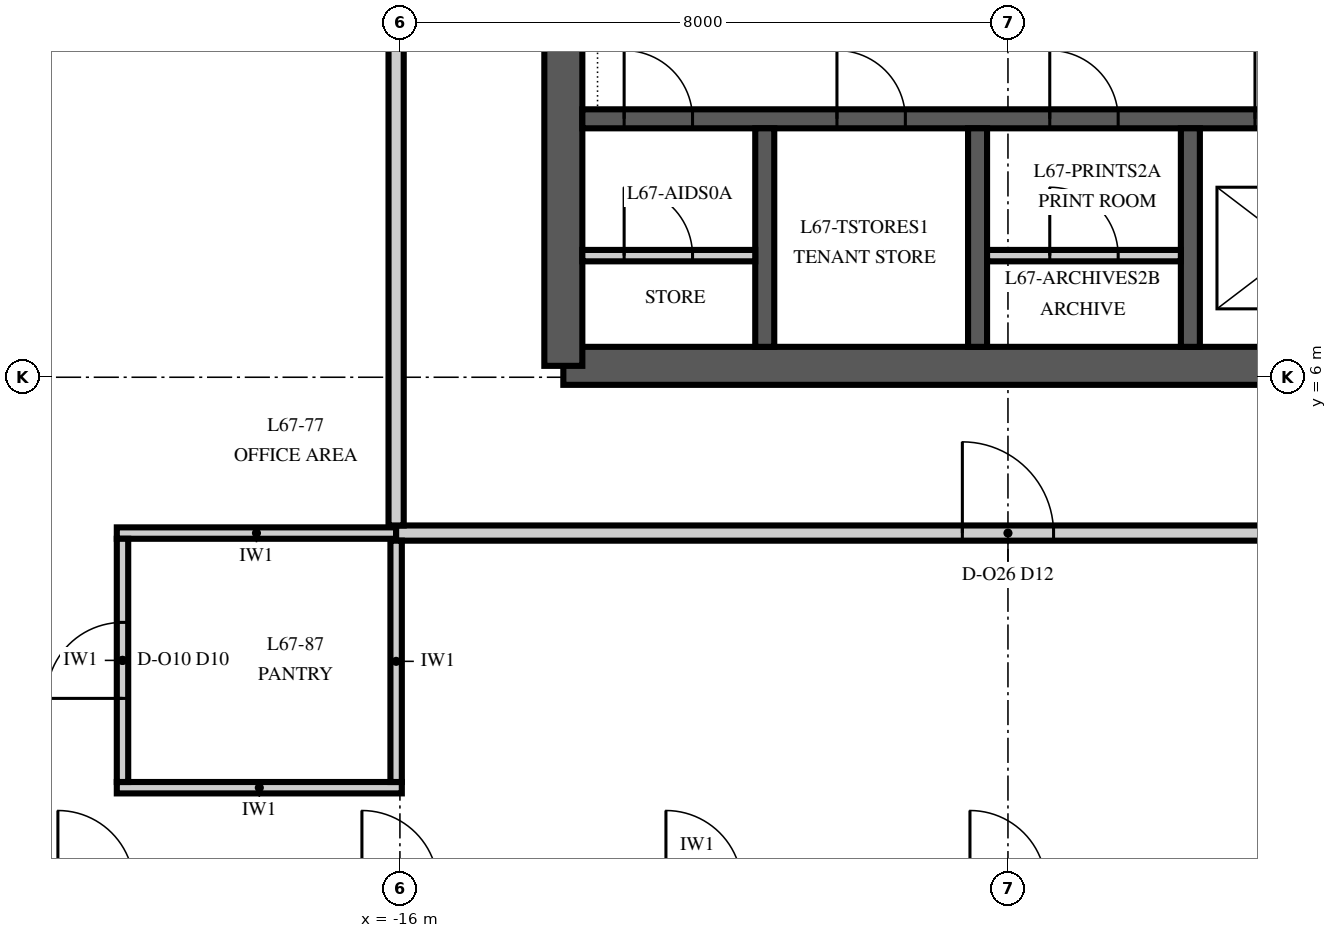
"""IFC4 building model, lengths in metres.
Left out: names, types, materials, properties, quantities, classifications, styles, units other than length and angle.
Written with IfcOpenShell. Run it as: python <this file> out.ifc"""

import sys

from ifc_helpers import new_model, si_unit, direction, frame, frame_2d, origin, place, context, subcontext, project, spatial, polyline, rectangle, outline, extrude, element, fill, save


model = new_model("IFC4")
c1 = context("Model", 3, precision=1e-05, world=origin(), true_north=direction((0.0, 1.0)))
c2 = subcontext(c1, "Body", "Model", "MODEL_VIEW")
j1 = project(units=[si_unit("LENGTHUNIT", "METRE"), si_unit("PLANEANGLEUNIT", "RADIAN")], contexts=[c1])
p1 = place(None, origin())
s1 = spatial("IfcSite", under=j1, at=p1, CompositionType="ELEMENT")
p2 = place(p1, origin())
s2 = spatial("IfcBuilding", under=s1, at=p2, CompositionType="ELEMENT")
p3 = place(p2, frame((0.0, 0.0, 288.0)))
s3 = spatial("IfcBuildingStorey", under=s2, at=p3, CompositionType="ELEMENT", Elevation=288.0)
p4 = place(p3, frame((-13.85, 6.15, 0.0), z_axis=(0.0, 0.0, 1.0), x_axis=(1.0, 0.0, 0.0)))
e1 = element("IfcWall", 1, at=p4, inside=s3, PredefinedType="SHEAR", context=c2, shape_type="SweptSolid", body=[
    extrude(rectangle(XDim=27.7, YDim=0.5, at=frame_2d((13.85, 0.0))), origin(), (0.0, 0.0, 1.0), 4.0),
])
p5 = place(p3, frame((-13.85, 23.85, 0.0), z_axis=(0.0, 0.0, 1.0), x_axis=(0.0, -1.0, 0.0)))
e2 = element("IfcWall", 2, at=p5, inside=s3, PredefinedType="SHEAR", context=c2, shape_type="SweptSolid", body=[
    extrude(outline(polyline([(0.0, -0.25), (17.7, -0.25), (17.7, 0.0), (17.45, 0.0), (17.45, 0.25), (0.25, 0.25), (0.25, 0.0), (0.0, 0.0), (0.0, -0.25)])), origin(), (0.0, 0.0, 1.0), 4.0),
])
p6 = place(p5, frame((11.75, 0.0, 0.0)))
e3 = element("IfcOpeningElement", 3, at=p6, cuts=e2, PredefinedType="OPENING", context=c2, shape_type="SweptSolid", body=[
    extrude(rectangle(XDim=1.8, YDim=2.4, at=frame_2d((0.9, 1.2))), frame((0.0, 0.265, 0.0), z_axis=(0.0, -1.0, 0.0), x_axis=(1.0, 0.0, 0.0)), (0.0, 0.0, 1.0), 0.53),
])
p7 = place(p3, frame((-13.6, 9.4, 0.0), z_axis=(0.0, 0.0, 1.0), x_axis=(1.0, 0.0, 0.0)))
e4 = element("IfcWall", 4, at=p7, inside=s3, PredefinedType="SHEAR", context=c2, shape_type="SweptSolid", body=[
    extrude(rectangle(XDim=27.2, YDim=0.25, at=frame_2d((13.6, 0.0))), origin(), (0.0, 0.0, 1.0), 4.0),
])
p8 = place(p7, frame((8.85, 0.0, 0.0)))
e5 = element("IfcOpeningElement", 5, at=p8, cuts=e4, PredefinedType="OPENING", context=c2, shape_type="SweptSolid", body=[
    extrude(rectangle(XDim=1.1, YDim=2.1, at=frame_2d((0.55, 1.05))), frame((0.0, 0.14, 0.0), z_axis=(0.0, -1.0, 0.0), x_axis=(1.0, 0.0, 0.0)), (0.0, 0.0, 1.0), 0.28),
])
p9 = place(p7, frame((11.65, 0.0, 0.0)))
e6 = element("IfcOpeningElement", 6, at=p9, cuts=e4, PredefinedType="OPENING", context=c2, shape_type="SweptSolid", body=[
    extrude(rectangle(XDim=1.1, YDim=2.1, at=frame_2d((0.55, 1.05))), frame((0.0, 0.14, 0.0), z_axis=(0.0, -1.0, 0.0), x_axis=(1.0, 0.0, 0.0)), (0.0, 0.0, 1.0), 0.28),
])
p10 = place(p7, frame((14.45, 0.0, 0.0)))
e7 = element("IfcOpeningElement", 7, at=p10, cuts=e4, PredefinedType="OPENING", context=c2, shape_type="SweptSolid", body=[
    extrude(rectangle(XDim=1.1, YDim=2.1, at=frame_2d((0.55, 1.05))), frame((0.0, 0.14, 0.0), z_axis=(0.0, -1.0, 0.0), x_axis=(1.0, 0.0, 0.0)), (0.0, 0.0, 1.0), 0.28),
])
p11 = place(p7, frame((0.55, 0.0, 0.0)))
e8 = element("IfcOpeningElement", 8, at=p11, cuts=e4, PredefinedType="OPENING", context=c2, shape_type="SweptSolid", body=[
    extrude(rectangle(XDim=0.9, YDim=2.1, at=frame_2d((0.45, 1.05))), frame((0.0, 0.14, 0.0), z_axis=(0.0, -1.0, 0.0), x_axis=(1.0, 0.0, 0.0)), (0.0, 0.0, 1.0), 0.28),
])
p12 = place(p7, frame((3.35, 0.0, 0.0)))
e9 = element("IfcOpeningElement", 9, at=p12, cuts=e4, PredefinedType="OPENING", context=c2, shape_type="SweptSolid", body=[
    extrude(rectangle(XDim=0.9, YDim=2.1, at=frame_2d((0.45, 1.05))), frame((0.0, 0.14, 0.0), z_axis=(0.0, -1.0, 0.0), x_axis=(1.0, 0.0, 0.0)), (0.0, 0.0, 1.0), 0.28),
])
p13 = place(p7, frame((6.15, 0.0, 0.0)))
e10 = element("IfcOpeningElement", 10, at=p13, cuts=e4, PredefinedType="OPENING", context=c2, shape_type="SweptSolid", body=[
    extrude(rectangle(XDim=0.9, YDim=2.1, at=frame_2d((0.45, 1.05))), frame((0.0, 0.14, 0.0), z_axis=(0.0, -1.0, 0.0), x_axis=(1.0, 0.0, 0.0)), (0.0, 0.0, 1.0), 0.28),
])
p14 = place(p7, frame((17.35, 0.0, 0.0)))
e11 = element("IfcOpeningElement", 11, at=p14, cuts=e4, PredefinedType="OPENING", context=c2, shape_type="SweptSolid", body=[
    extrude(rectangle(XDim=0.9, YDim=2.1, at=frame_2d((0.45, 1.05))), frame((0.0, 0.14, 0.0), z_axis=(0.0, -1.0, 0.0), x_axis=(1.0, 0.0, 0.0)), (0.0, 0.0, 1.0), 0.28),
])
p15 = place(p7, frame((20.15, 0.0, 0.0)))
e12 = element("IfcOpeningElement", 12, at=p15, cuts=e4, PredefinedType="OPENING", context=c2, shape_type="SweptSolid", body=[
    extrude(rectangle(XDim=0.9, YDim=2.1, at=frame_2d((0.45, 1.05))), frame((0.0, 0.14, 0.0), z_axis=(0.0, -1.0, 0.0), x_axis=(1.0, 0.0, 0.0)), (0.0, 0.0, 1.0), 0.28),
])
p16 = place(p7, frame((22.95, 0.0, 0.0)))
e13 = element("IfcOpeningElement", 13, at=p16, cuts=e4, PredefinedType="OPENING", context=c2, shape_type="SweptSolid", body=[
    extrude(rectangle(XDim=0.9, YDim=2.1, at=frame_2d((0.45, 1.05))), frame((0.0, 0.14, 0.0), z_axis=(0.0, -1.0, 0.0), x_axis=(1.0, 0.0, 0.0)), (0.0, 0.0, 1.0), 0.28),
])
for number, where, z_axis, x_axis in (
    (14, (-11.2, 6.4, 0.0), (0.0, 0.0, 1.0), (0.0, 1.0, 0.0)),
    (15, (-8.4, 6.4, 0.0), (0.0, 0.0, 1.0), (0.0, 1.0, 0.0)),
    (16, (-5.6, 6.4, 0.0), (0.0, 0.0, 1.0), (0.0, 1.0, 0.0)),
):
    element("IfcWall", number, at=place(p3, frame(where, z_axis=z_axis, x_axis=x_axis)), inside=s3, PredefinedType="SHEAR", context=c2, shape_type="SweptSolid", body=[
        extrude(rectangle(XDim=2.875, YDim=0.25, at=frame_2d((1.438, 0.0))), origin(), (0.0, 0.0, 1.0), 4.0),
    ])
p17 = place(p3, frame((-13.6, 7.6, 0.0), z_axis=(0.0, 0.0, 1.0), x_axis=(1.0, 0.0, 0.0)))
e17 = element("IfcWall", 17, at=p17, inside=s3, PredefinedType="PARTITIONING", context=c2, shape_type="SweptSolid", body=[
    extrude(rectangle(XDim=2.275, YDim=0.15, at=frame_2d((1.138, 0.0))), origin(), (0.0, 0.0, 1.0), 3.85),
])
p18 = place(p17, frame((0.55, 0.0, 0.0)))
e18 = element("IfcOpeningElement", 18, at=p18, cuts=e17, PredefinedType="OPENING", context=c2, shape_type="SweptSolid", body=[
    extrude(rectangle(XDim=0.9, YDim=2.1, at=frame_2d((0.45, 1.05))), frame((0.0, 0.09, 0.0), z_axis=(0.0, -1.0, 0.0), x_axis=(1.0, 0.0, 0.0)), (0.0, 0.0, 1.0), 0.18),
])
p19 = place(p3, frame((-8.275, 7.6, 0.0), z_axis=(0.0, 0.0, 1.0), x_axis=(1.0, 0.0, 0.0)))
e19 = element("IfcWall", 19, at=p19, inside=s3, PredefinedType="PARTITIONING", context=c2, shape_type="SweptSolid", body=[
    extrude(rectangle(XDim=2.55, YDim=0.15, at=frame_2d((1.275, 0.0))), origin(), (0.0, 0.0, 1.0), 3.85),
])
p20 = place(p19, frame((0.825, 0.0, 0.0)))
e20 = element("IfcOpeningElement", 20, at=p20, cuts=e19, PredefinedType="OPENING", context=c2, shape_type="SweptSolid", body=[
    extrude(rectangle(XDim=0.9, YDim=2.1, at=frame_2d((0.45, 1.05))), frame((0.0, 0.09, 0.0), z_axis=(0.0, -1.0, 0.0), x_axis=(1.0, 0.0, 0.0)), (0.0, 0.0, 1.0), 0.18),
])
p21 = place(p3, frame((-19.725, 0.6, 0.0), z_axis=(0.0, 0.0, 1.0), x_axis=(1.0, 0.0, 0.0)))
e21 = element("IfcWall", 21, at=p21, inside=s3, PredefinedType="PARTITIONING", context=c2, shape_type="SweptSolid", body=[
    extrude(rectangle(XDim=3.75, YDim=0.15, at=frame_2d((1.875, 0.0))), origin(), (0.0, 0.0, 1.0), 3.23),
])
p22 = place(p3, frame((-19.725, 3.95, 0.0), z_axis=(0.0, 0.0, 1.0), x_axis=(1.0, 0.0, 0.0)))
e22 = element("IfcWall", 22, at=p22, inside=s3, PredefinedType="PARTITIONING", context=c2, shape_type="SweptSolid", body=[
    extrude(rectangle(XDim=3.675, YDim=0.15, at=frame_2d((1.837, 0.0))), origin(), (0.0, 0.0, 1.0), 3.23),
])
p23 = place(p3, frame((-16.05, 3.95, 0.0), z_axis=(0.0, 0.0, 1.0), x_axis=(1.0, 0.0, 0.0)))
e23 = element("IfcWall", 23, at=p23, inside=s3, PredefinedType="PARTITIONING", context=c2, shape_type="SweptSolid", body=[
    extrude(rectangle(XDim=32.2, YDim=0.2, at=frame_2d((16.1, 0.0))), origin(), (0.0, 0.0, 1.0), 3.23),
])
p24 = place(p23, frame((7.45, 0.0, 0.0)))
e24 = element("IfcOpeningElement", 24, at=p24, cuts=e23, PredefinedType="OPENING", context=c2, shape_type="SweptSolid", body=[
    extrude(rectangle(XDim=1.2, YDim=2.4, at=frame_2d((0.6, 1.2))), frame((0.0, 0.115, 0.0), z_axis=(0.0, -1.0, 0.0), x_axis=(1.0, 0.0, 0.0)), (0.0, 0.0, 1.0), 0.23),
])
p25 = place(p23, frame((23.45, 0.0, 0.0)))
e25 = element("IfcOpeningElement", 25, at=p25, cuts=e23, PredefinedType="OPENING", context=c2, shape_type="SweptSolid", body=[
    extrude(rectangle(XDim=1.2, YDim=2.4, at=frame_2d((0.6, 1.2))), frame((0.0, 0.115, 0.0), z_axis=(0.0, -1.0, 0.0), x_axis=(1.0, 0.0, 0.0)), (0.0, 0.0, 1.0), 0.23),
])
p26 = place(p3, frame((-19.65, 0.675, 0.0), z_axis=(0.0, 0.0, 1.0), x_axis=(0.0, 1.0, 0.0)))
e26 = element("IfcWall", 26, at=p26, inside=s3, PredefinedType="PARTITIONING", context=c2, shape_type="SweptSolid", body=[
    extrude(rectangle(XDim=3.2, YDim=0.15, at=frame_2d((1.6, 0.0))), origin(), (0.0, 0.0, 1.0), 3.85),
])
p27 = place(p26, frame((1.1, 0.0, 0.0)))
e27 = element("IfcOpeningElement", 27, at=p27, cuts=e26, PredefinedType="OPENING", context=c2, shape_type="SweptSolid", body=[
    extrude(rectangle(XDim=1.0, YDim=2.3, at=frame_2d((0.5, 1.15))), frame((0.0, 0.09, 0.0), z_axis=(0.0, -1.0, 0.0), x_axis=(1.0, 0.0, 0.0)), (0.0, 0.0, 1.0), 0.18),
])
p28 = place(p3, frame((-16.05, 0.675, 0.0), z_axis=(0.0, 0.0, 1.0), x_axis=(0.0, 1.0, 0.0)))
e28 = element("IfcWall", 28, at=p28, inside=s3, PredefinedType="PARTITIONING", context=c2, shape_type="SweptSolid", body=[
    extrude(rectangle(XDim=3.175, YDim=0.15, at=frame_2d((1.587, 0.0))), origin(), (0.0, 0.0, 1.0), 3.85),
])
p29 = place(p3, frame((-16.05, 4.05, 0.0), z_axis=(0.0, 0.0, 1.0), x_axis=(0.0, 1.0, 0.0)))
e29 = element("IfcWall", 29, at=p29, inside=s3, PredefinedType="PARTITIONING", context=c2, shape_type="SweptSolid", body=[
    extrude(rectangle(XDim=21.9, YDim=0.2, at=frame_2d((10.95, 0.0))), origin(), (0.0, 0.0, 1.0), 2.842),
])
p30 = place(p29, frame((20.35, 0.0, 0.0)))
e30 = element("IfcOpeningElement", 30, at=p30, cuts=e29, PredefinedType="OPENING", context=c2, shape_type="SweptSolid", body=[
    extrude(rectangle(XDim=1.2, YDim=2.4, at=frame_2d((0.6, 1.2))), frame((0.0, 0.115, 0.0), z_axis=(0.0, -1.0, 0.0), x_axis=(1.0, 0.0, 0.0)), (0.0, 0.0, 1.0), 0.23),
])
p31 = place(p29, frame((10.35, 0.0, 0.0)))
e31 = element("IfcOpeningElement", 31, at=p31, cuts=e29, PredefinedType="OPENING", context=c2, shape_type="SweptSolid", body=[
    extrude(rectangle(XDim=1.2, YDim=2.4, at=frame_2d((0.6, 1.2))), frame((0.0, 0.115, 0.0), z_axis=(0.0, -1.0, 0.0), x_axis=(1.0, 0.0, 0.0)), (0.0, 0.0, 1.0), 0.23),
])
p32 = place(p8, origin())
e32 = element("IfcDoor", 32, at=p32, inside=s3, OperationType="SLIDING_TO_LEFT", PredefinedType="DOOR", context=c2, shape_type="SweptSolid", body=[
    extrude(rectangle(XDim=1.1, YDim=2.1, at=frame_2d((0.55, 1.05))), frame((0.0, 0.125, 0.0), z_axis=(0.0, -1.0, 0.0), x_axis=(1.0, 0.0, 0.0)), (0.0, 0.0, 1.0), 0.25),
])
fill(e5, e32)
p33 = place(p11, origin())
e33 = element("IfcDoor", 33, at=p33, inside=s3, OperationType="SINGLE_SWING_LEFT", PredefinedType="DOOR", context=c2, shape_type="SweptSolid", body=[
    extrude(rectangle(XDim=0.9, YDim=2.1, at=frame_2d((0.45, 1.05))), frame((0.0, 0.125, 0.0), z_axis=(0.0, -1.0, 0.0), x_axis=(1.0, 0.0, 0.0)), (0.0, 0.0, 1.0), 0.25),
])
fill(e8, e33)
p34 = place(p18, origin())
e34 = element("IfcDoor", 34, at=p34, inside=s3, OperationType="SINGLE_SWING_LEFT", PredefinedType="DOOR", context=c2, shape_type="SweptSolid", body=[
    extrude(rectangle(XDim=0.9, YDim=2.1, at=frame_2d((0.45, 1.05))), frame((0.0, 0.075, 0.0), z_axis=(0.0, -1.0, 0.0), x_axis=(1.0, 0.0, 0.0)), (0.0, 0.0, 1.0), 0.149),
])
fill(e18, e34)
p35 = place(p12, origin())
e35 = element("IfcDoor", 35, at=p35, inside=s3, OperationType="SINGLE_SWING_LEFT", PredefinedType="DOOR", context=c2, shape_type="SweptSolid", body=[
    extrude(rectangle(XDim=0.9, YDim=2.1, at=frame_2d((0.45, 1.05))), frame((0.0, 0.125, 0.0), z_axis=(0.0, -1.0, 0.0), x_axis=(1.0, 0.0, 0.0)), (0.0, 0.0, 1.0), 0.25),
])
fill(e9, e35)
p36 = place(p13, origin())
e36 = element("IfcDoor", 36, at=p36, inside=s3, OperationType="SINGLE_SWING_LEFT", PredefinedType="DOOR", context=c2, shape_type="SweptSolid", body=[
    extrude(rectangle(XDim=0.9, YDim=2.1, at=frame_2d((0.45, 1.05))), frame((0.0, 0.125, 0.0), z_axis=(0.0, -1.0, 0.0), x_axis=(1.0, 0.0, 0.0)), (0.0, 0.0, 1.0), 0.25),
])
fill(e10, e36)
p37 = place(p20, origin())
e37 = element("IfcDoor", 37, at=p37, inside=s3, OperationType="SINGLE_SWING_LEFT", PredefinedType="DOOR", context=c2, shape_type="SweptSolid", body=[
    extrude(rectangle(XDim=0.9, YDim=2.1, at=frame_2d((0.45, 1.05))), frame((0.0, 0.075, 0.0), z_axis=(0.0, -1.0, 0.0), x_axis=(1.0, 0.0, 0.0)), (0.0, 0.0, 1.0), 0.149),
])
fill(e20, e37)
p38 = place(p27, origin())
e38 = element("IfcDoor", 38, at=p38, inside=s3, OperationType="SINGLE_SWING_LEFT", PredefinedType="DOOR", context=c2, shape_type="SweptSolid", body=[
    extrude(rectangle(XDim=1.0, YDim=2.3, at=frame_2d((0.5, 1.15))), frame((0.0, 0.075, 0.0), z_axis=(0.0, -1.0, 0.0), x_axis=(1.0, 0.0, 0.0)), (0.0, 0.0, 1.0), 0.149),
])
fill(e27, e38)
p39 = place(p24, origin())
e39 = element("IfcDoor", 39, at=p39, inside=s3, OperationType="SINGLE_SWING_LEFT", PredefinedType="DOOR", context=c2, shape_type="SweptSolid", body=[
    extrude(rectangle(XDim=1.2, YDim=2.4, at=frame_2d((0.6, 1.2))), frame((0.0, 0.1, 0.0), z_axis=(0.0, -1.0, 0.0), x_axis=(1.0, 0.0, 0.0)), (0.0, 0.0, 1.0), 0.199),
])
fill(e24, e39)
save(model, sys.argv[1])
